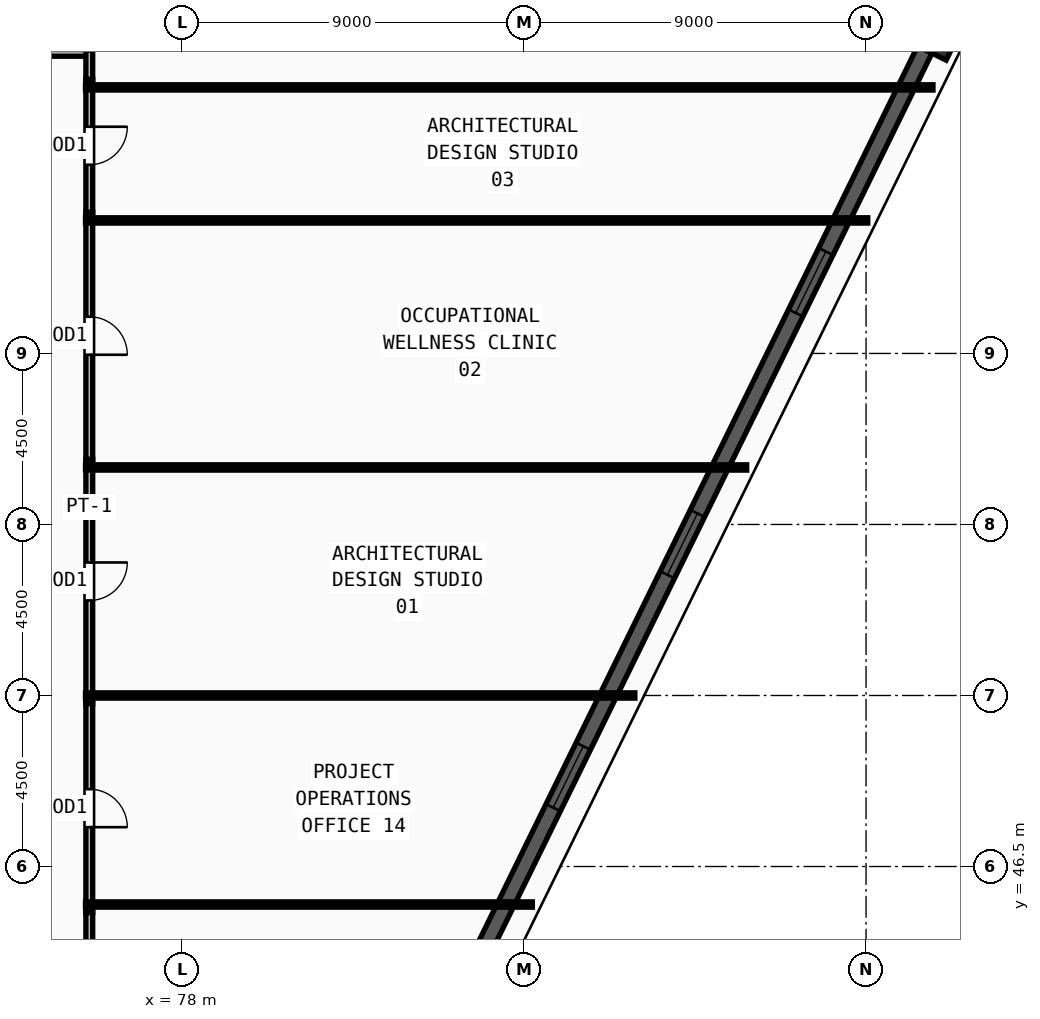
"""IFC4 building model, lengths in metres.
Left out: names, types, materials, properties, quantities, classifications, styles, units other than length and angle.
Written with IfcOpenShell. Run it as: python <this file> out.ifc"""

import sys

from ifc_helpers import new_model, si_unit, direction, frame, frame_2d, origin, origin_2d, place, context, subcontext, project, spatial, rectangle, extrude, source, transform, mapped, element, fill, save


model = new_model("IFC4")
c1 = context("Model", 3, precision=1e-05, world=origin(), true_north=direction((0.0, 1.0)))
c2 = subcontext(c1, "Body", "Model", "MODEL_VIEW")
j1 = project(units=[si_unit("LENGTHUNIT", "METRE"), si_unit("PLANEANGLEUNIT", "RADIAN")], contexts=[c1])
p1 = place(None, origin())
s1 = spatial("IfcSite", under=j1, at=p1, CompositionType="ELEMENT")
p2 = place(p1, origin())
s2 = spatial("IfcBuilding", under=s1, at=p2, CompositionType="ELEMENT")
p3 = place(p2, frame((0.0, 0.0, 74.25)))
s3 = spatial("IfcBuildingStorey", under=s2, at=p3, CompositionType="ELEMENT", Elevation=74.25)
m1 = source(origin(), c2, "Body", "SweptSolid", [
    extrude(rectangle(XDim=1.55, YDim=1.25, at=origin_2d()), origin(), (0.0, 0.0, 1.0), 3.75),
])
p4 = place(p3, frame((97.887, 68.688, 0.0), z_axis=(0.0, 0.0, 1.0), x_axis=(0.440252613806, 0.897873953312, 0.0)))
e1 = element("IfcColumn", 1, at=p4, inside=s3, PredefinedType="COLUMN", context=c2, shape_type="MappedRepresentation", body=[
    mapped(m1, transform((0.0, 0.0, 0.0), x_axis=(1.0, 0.0, 0.0), y_axis=(0.0, 1.0, 0.0), z_axis=(0.0, 0.0, 1.0), scale=1.0)),
])
p5 = place(p3, frame((85.533, 43.493, 0.0), z_axis=(0.0, 0.0, 1.0), x_axis=(0.440255770672, 0.897872405406, 0.0)))
e2 = element("IfcWall", 2, at=p5, inside=s3, PredefinedType="SOLIDWALL", context=c2, shape_type="SweptSolid", body=[
    extrude(rectangle(XDim=27.296, YDim=0.42, at=frame_2d((13.648, 0.0))), origin(), (0.0, 0.0, 1.0), 3.57),
])
m2 = source(origin(), c2, "Body", "SweptSolid", [
    extrude(rectangle(XDim=1.8, YDim=1.95, at=frame_2d((0.9, 0.975))), frame((0.0, 0.22, 0.0), z_axis=(0.0, -1.0, 0.0), x_axis=(1.0, 0.0, 0.0)), (0.0, 0.0, 1.0), 0.44),
])
p6 = place(p5, frame((5.074, 0.0, 0.55)))
e3 = element("IfcOpeningElement", 3, at=p6, cuts=e2, PredefinedType="OPENING", context=c2, shape_type="MappedRepresentation", body=[
    mapped(m2, transform((0.0, 0.0, 0.0), x_axis=(1.0, 0.0, 0.0), y_axis=(0.0, 1.0, 0.0), z_axis=(0.0, 0.0, 1.0), scale=1.0)),
])
p7 = place(p5, frame((11.898, 0.0, 0.55)))
e4 = element("IfcOpeningElement", 4, at=p7, cuts=e2, PredefinedType="OPENING", context=c2, shape_type="MappedRepresentation", body=[
    mapped(m2, transform((0.0, 0.0, 0.0), x_axis=(1.0, 0.0, 0.0), y_axis=(0.0, 1.0, 0.0), z_axis=(0.0, 0.0, 1.0), scale=1.0)),
])
p8 = place(p5, frame((19.572, 0.0, 0.55)))
e5 = element("IfcOpeningElement", 5, at=p8, cuts=e2, PredefinedType="OPENING", context=c2, shape_type="MappedRepresentation", body=[
    mapped(m2, transform((0.0, 0.0, 0.0), x_axis=(1.0, 0.0, 0.0), y_axis=(0.0, 1.0, 0.0), z_axis=(0.0, 0.0, 1.0), scale=1.0)),
])
p9 = place(p3, frame((75.56, 57.215, 0.0), z_axis=(0.0, 0.0, 1.0), x_axis=(0.0, -1.0, 0.0)))
e6 = element("IfcWall", 6, at=p9, inside=s3, PredefinedType="PARTITIONING", context=c2, shape_type="SweptSolid", body=[
    extrude(rectangle(XDim=6.43, YDim=0.18, at=frame_2d((3.215, 0.0))), origin(), (0.0, 0.0, 1.0), 3.57),
])
m3 = source(origin(), c2, "Body", "SweptSolid", [
    extrude(rectangle(XDim=1.0, YDim=2.2, at=frame_2d((0.5, 1.1))), frame((0.0, 0.1, 0.0), z_axis=(0.0, -1.0, 0.0), x_axis=(1.0, 0.0, 0.0)), (0.0, 0.0, 1.0), 0.2),
])
p10 = place(p9, frame((2.715, 0.0, 0.0)))
e7 = element("IfcOpeningElement", 7, at=p10, cuts=e6, PredefinedType="OPENING", context=c2, shape_type="MappedRepresentation", body=[
    mapped(m3, transform((0.0, 0.0, 0.0), x_axis=(1.0, 0.0, 0.0), y_axis=(0.0, 1.0, 0.0), z_axis=(0.0, 0.0, 1.0), scale=1.0)),
])
p11 = place(p3, frame((75.56, 63.715, 0.0), z_axis=(0.0, 0.0, 1.0), x_axis=(0.0, -1.0, 0.0)))
e8 = element("IfcWall", 8, at=p11, inside=s3, PredefinedType="PARTITIONING", context=c2, shape_type="SweptSolid", body=[
    extrude(rectangle(XDim=6.5, YDim=0.18, at=frame_2d((3.25, 0.0))), origin(), (0.0, 0.0, 1.0), 3.57),
])
p12 = place(p11, frame((2.75, 0.0, 0.0)))
e9 = element("IfcOpeningElement", 9, at=p12, cuts=e8, PredefinedType="OPENING", context=c2, shape_type="MappedRepresentation", body=[
    mapped(m3, transform((0.0, 0.0, 0.0), x_axis=(1.0, 0.0, 0.0), y_axis=(0.0, 1.0, 0.0), z_axis=(0.0, 0.0, 1.0), scale=1.0)),
])
p13 = place(p3, frame((75.56, 67.215, 0.0), z_axis=(0.0, 0.0, 1.0), x_axis=(0.0, -1.0, 0.0)))
e10 = element("IfcWall", 10, at=p13, inside=s3, PredefinedType="PARTITIONING", context=c2, shape_type="SweptSolid", body=[
    extrude(rectangle(XDim=3.5, YDim=0.18, at=frame_2d((1.75, 0.0))), origin(), (0.0, 0.0, 1.0), 3.57),
])
p14 = place(p13, frame((1.25, 0.0, 0.0)))
e11 = element("IfcOpeningElement", 11, at=p14, cuts=e10, PredefinedType="OPENING", context=c2, shape_type="MappedRepresentation", body=[
    mapped(m3, transform((0.0, 0.0, 0.0), x_axis=(1.0, 0.0, 0.0), y_axis=(0.0, 1.0, 0.0), z_axis=(0.0, 0.0, 1.0), scale=1.0)),
])
p15 = place(p3, frame((69.285, 67.91, 0.0), z_axis=(0.0, 0.0, 1.0), x_axis=(1.0, 0.0, 0.0)))
e12 = element("IfcWall", 12, at=p15, inside=s3, PredefinedType="PARTITIONING", context=c2, shape_type="SweptSolid", body=[
    extrude(rectangle(XDim=6.345, YDim=0.18, at=frame_2d((3.172, 0.0))), origin(), (0.0, 0.0, 1.0), 3.57),
])
m4 = source(origin(), c2, "Body", "SweptSolid", [
    extrude(rectangle(XDim=1.5, YDim=2.2, at=frame_2d((0.75, 1.1))), frame((0.0, 0.1, 0.0), z_axis=(0.0, -1.0, 0.0), x_axis=(1.0, 0.0, 0.0)), (0.0, 0.0, 1.0), 0.2),
])
p16 = place(p15, frame((2.422, 0.0, 0.0)))
e13 = element("IfcOpeningElement", 13, at=p16, cuts=e12, PredefinedType="OPENING", context=c2, shape_type="MappedRepresentation", body=[
    mapped(m4, transform((0.0, 0.0, 0.0), x_axis=(1.0, 0.0, 0.0), y_axis=(0.0, 1.0, 0.0), z_axis=(0.0, 0.0, 1.0), scale=1.0)),
])
p17 = place(p3, frame((75.56, 50.785, 0.0), z_axis=(0.0, 0.0, 1.0), x_axis=(0.0, -1.0, 0.0)))
e14 = element("IfcWall", 14, at=p17, inside=s3, PredefinedType="PARTITIONING", context=c2, shape_type="SweptSolid", body=[
    extrude(rectangle(XDim=5.5, YDim=0.18, at=frame_2d((2.75, 0.0))), origin(), (0.0, 0.0, 1.0), 3.57),
])
p18 = place(p17, frame((2.25, 0.0, 0.0)))
e15 = element("IfcOpeningElement", 15, at=p18, cuts=e14, PredefinedType="OPENING", context=c2, shape_type="MappedRepresentation", body=[
    mapped(m3, transform((0.0, 0.0, 0.0), x_axis=(1.0, 0.0, 0.0), y_axis=(0.0, 1.0, 0.0), z_axis=(0.0, 0.0, 1.0), scale=1.0)),
])
p19 = place(p3, frame((75.56, 67.98, 0.0), z_axis=(0.0, 0.0, 1.0), x_axis=(0.0, -1.0, 0.0)))
e16 = element("IfcWall", 16, at=p19, inside=s3, PredefinedType="PARTITIONING", context=c2, shape_type="SweptSolid", body=[
    extrude(rectangle(XDim=0.765, YDim=0.18, at=frame_2d((0.382, 0.0))), origin(), (0.0, 0.0, 1.0), 3.57),
])
p20 = place(p3, frame((75.56, 45.285, 0.0), z_axis=(0.0, 0.0, 1.0), x_axis=(0.0, -1.0, 0.0)))
e17 = element("IfcWall", 17, at=p20, inside=s3, PredefinedType="PARTITIONING", context=c2, shape_type="SweptSolid", body=[
    extrude(rectangle(XDim=1.615, YDim=0.18, at=frame_2d((0.808, 0.0))), origin(), (0.0, 0.0, 1.0), 3.57),
])
p21 = place(p3, frame((75.46, 45.5, 0.0), z_axis=(0.0, 0.0, 1.0), x_axis=(1.0, 0.0, 0.0)))
e18 = element("IfcWall", 18, at=p21, inside=s3, PredefinedType="PARTITIONING", context=c2, shape_type="SweptSolid", body=[
    extrude(rectangle(XDim=11.759, YDim=0.14, at=frame_2d((5.879, 0.0))), origin(), (0.0, 0.0, 1.0), 3.57),
])
p22 = place(p3, frame((75.46, 51.0, 0.0), z_axis=(0.0, 0.0, 1.0), x_axis=(1.0, 0.0, 0.0)))
e19 = element("IfcWall", 19, at=p22, inside=s3, PredefinedType="PARTITIONING", context=c2, shape_type="SweptSolid", body=[
    extrude(rectangle(XDim=14.456, YDim=0.14, at=frame_2d((7.228, 0.0))), origin(), (0.0, 0.0, 1.0), 3.57),
])
p23 = place(p3, frame((75.46, 57.0, 0.0), z_axis=(0.0, 0.0, 1.0), x_axis=(1.0, 0.0, 0.0)))
e20 = element("IfcWall", 20, at=p23, inside=s3, PredefinedType="PARTITIONING", context=c2, shape_type="SweptSolid", body=[
    extrude(rectangle(XDim=17.398, YDim=0.14, at=frame_2d((8.699, 0.0))), origin(), (0.0, 0.0, 1.0), 3.57),
])
p24 = place(p3, frame((75.46, 63.5, 0.0), z_axis=(0.0, 0.0, 1.0), x_axis=(1.0, 0.0, 0.0)))
e21 = element("IfcWall", 21, at=p24, inside=s3, PredefinedType="PARTITIONING", context=c2, shape_type="SweptSolid", body=[
    extrude(rectangle(XDim=20.585, YDim=0.14, at=frame_2d((10.292, 0.0))), origin(), (0.0, 0.0, 1.0), 2.655),
])
p25 = place(p3, frame((75.46, 67.0, 0.0), z_axis=(0.0, 0.0, 1.0), x_axis=(1.0, 0.0, 0.0)))
e22 = element("IfcWall", 22, at=p25, inside=s3, PredefinedType="PARTITIONING", context=c2, shape_type="SweptSolid", body=[
    extrude(rectangle(XDim=22.301, YDim=0.14, at=frame_2d((11.15, 0.0))), origin(), (0.0, 0.0, 1.0), 2.655),
])
m5 = source(origin(), c2, "Body", "SweptSolid", [
    extrude(rectangle(XDim=1.8, YDim=1.95, at=frame_2d((0.9, 0.975))), frame((0.0, 0.03, 0.0), z_axis=(0.0, -1.0, 0.0), x_axis=(1.0, 0.0, 0.0)), (0.0, 0.0, 1.0), 0.06),
])
p26 = place(p6, origin())
e23 = element("IfcWindow", 23, at=p26, inside=s3, PartitioningType="DOUBLE_PANEL_VERTICAL", PredefinedType="WINDOW", context=c2, shape_type="MappedRepresentation", body=[
    mapped(m5, transform((0.0, 0.0, 0.0), x_axis=(1.0, 0.0, 0.0), y_axis=(0.0, 1.0, 0.0), z_axis=(0.0, 0.0, 1.0), scale=1.0)),
])
fill(e3, e23)
p27 = place(p7, origin())
e24 = element("IfcWindow", 24, at=p27, inside=s3, PartitioningType="DOUBLE_PANEL_VERTICAL", PredefinedType="WINDOW", context=c2, shape_type="MappedRepresentation", body=[
    mapped(m5, transform((0.0, 0.0, 0.0), x_axis=(1.0, 0.0, 0.0), y_axis=(0.0, 1.0, 0.0), z_axis=(0.0, 0.0, 1.0), scale=1.0)),
])
fill(e4, e24)
p28 = place(p8, origin())
e25 = element("IfcWindow", 25, at=p28, inside=s3, PartitioningType="DOUBLE_PANEL_VERTICAL", PredefinedType="WINDOW", context=c2, shape_type="MappedRepresentation", body=[
    mapped(m5, transform((0.0, 0.0, 0.0), x_axis=(1.0, 0.0, 0.0), y_axis=(0.0, 1.0, 0.0), z_axis=(0.0, 0.0, 1.0), scale=1.0)),
])
fill(e5, e25)
m6 = source(origin(), c2, "Body", "SweptSolid", [
    extrude(rectangle(XDim=1.0, YDim=2.2, at=frame_2d((0.5, 1.1))), frame((0.0, 0.025, 0.0), z_axis=(0.0, -1.0, 0.0), x_axis=(1.0, 0.0, 0.0)), (0.0, 0.0, 1.0), 0.05),
])
p29 = place(p10, origin())
e26 = element("IfcDoor", 26, at=p29, inside=s3, OperationType="SINGLE_SWING_LEFT", PredefinedType="DOOR", context=c2, shape_type="MappedRepresentation", body=[
    mapped(m6, transform((0.0, 0.0, 0.0), x_axis=(1.0, 0.0, 0.0), y_axis=(0.0, 1.0, 0.0), z_axis=(0.0, 0.0, 1.0), scale=1.0)),
])
fill(e7, e26)
p30 = place(p12, origin())
e27 = element("IfcDoor", 27, at=p30, inside=s3, OperationType="SINGLE_SWING_RIGHT", PredefinedType="DOOR", context=c2, shape_type="MappedRepresentation", body=[
    mapped(m6, transform((0.0, 0.0, 0.0), x_axis=(1.0, 0.0, 0.0), y_axis=(0.0, 1.0, 0.0), z_axis=(0.0, 0.0, 1.0), scale=1.0)),
])
fill(e9, e27)
p31 = place(p14, origin())
e28 = element("IfcDoor", 28, at=p31, inside=s3, OperationType="SINGLE_SWING_LEFT", PredefinedType="DOOR", context=c2, shape_type="MappedRepresentation", body=[
    mapped(m6, transform((0.0, 0.0, 0.0), x_axis=(1.0, 0.0, 0.0), y_axis=(0.0, 1.0, 0.0), z_axis=(0.0, 0.0, 1.0), scale=1.0)),
])
fill(e11, e28)
p32 = place(p18, origin())
e29 = element("IfcDoor", 29, at=p32, inside=s3, OperationType="SINGLE_SWING_RIGHT", PredefinedType="DOOR", context=c2, shape_type="MappedRepresentation", body=[
    mapped(m6, transform((0.0, 0.0, 0.0), x_axis=(1.0, 0.0, 0.0), y_axis=(0.0, 1.0, 0.0), z_axis=(0.0, 0.0, 1.0), scale=1.0)),
])
fill(e15, e29)
save(model, sys.argv[1])
